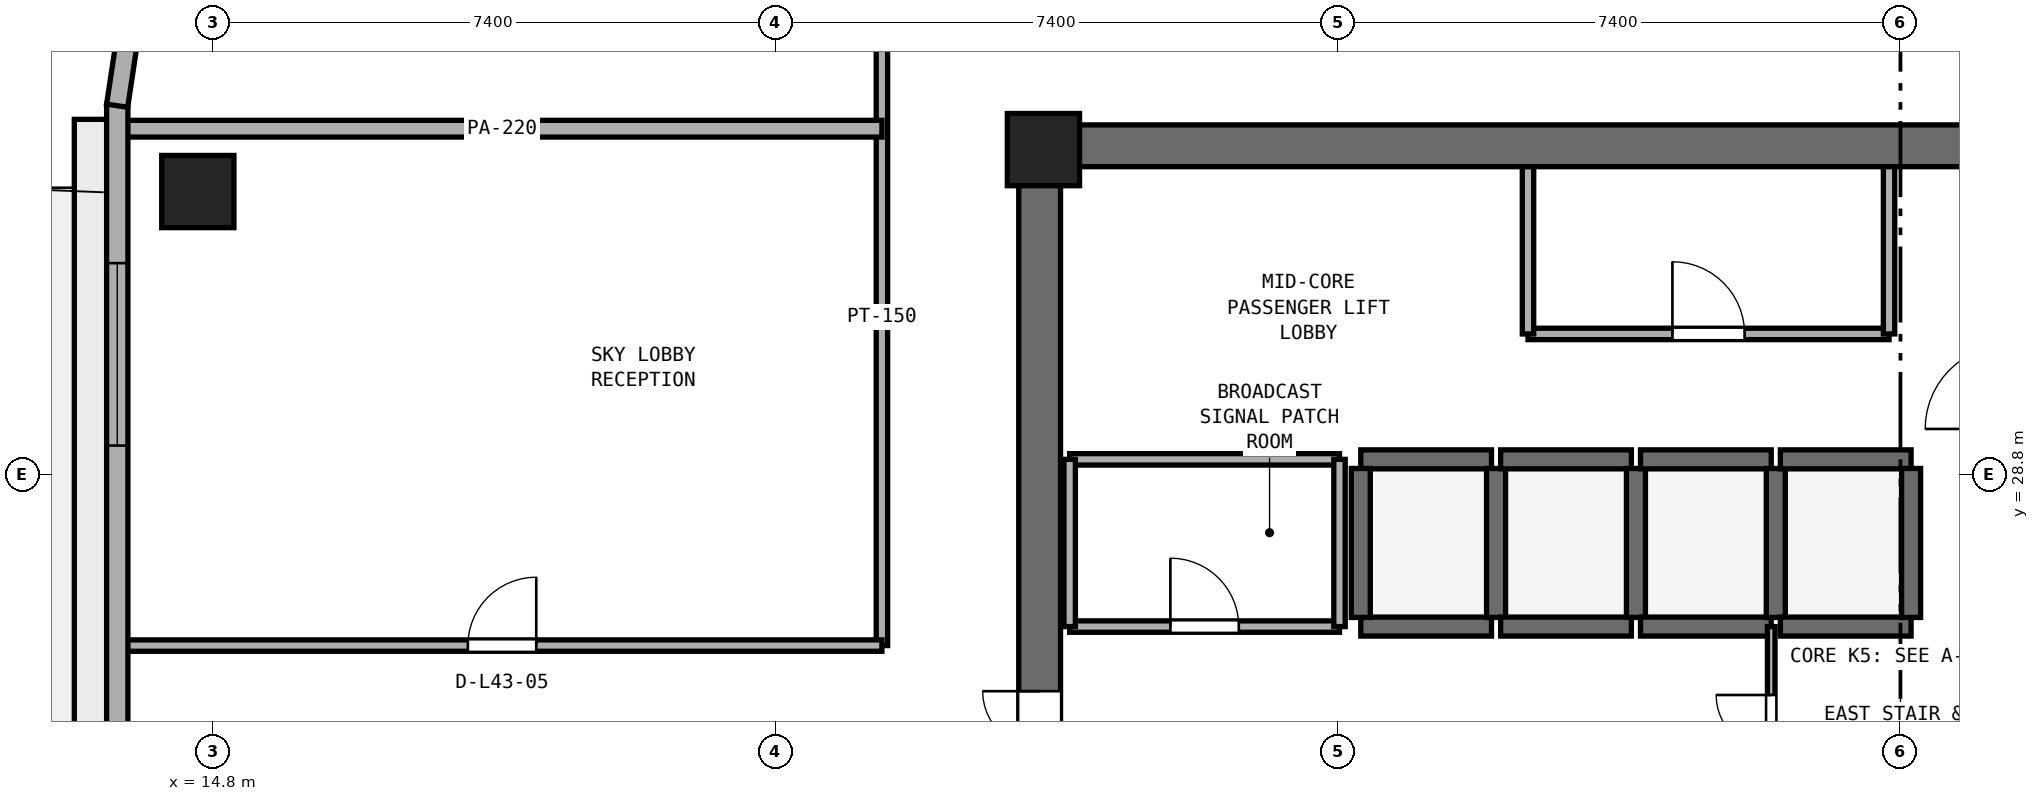
"""IFC4 building model, lengths in metres.
Left out: names, types, materials, properties, quantities, classifications, styles, units other than length and angle.
Written with IfcOpenShell. Run it as: python <this file> out.ifc"""

import sys

from ifc_helpers import new_model, si_unit, direction, frame, frame_2d, origin, origin_2d, place, context, subcontext, project, spatial, rectangle, extrude, element, fill, save


model = new_model("IFC4")
c1 = context("Model", 3, precision=1e-05, world=origin(), true_north=direction((0.0, 1.0)))
c2 = subcontext(c1, "Body", "Model", "MODEL_VIEW")
j1 = project(units=[si_unit("LENGTHUNIT", "METRE"), si_unit("PLANEANGLEUNIT", "RADIAN")], contexts=[c1])
p1 = place(None, origin())
s1 = spatial("IfcSite", under=j1, at=p1, CompositionType="ELEMENT")
p2 = place(p1, origin())
s2 = spatial("IfcBuilding", under=s1, at=p2, CompositionType="ELEMENT")
p3 = place(p2, frame((0.0, 0.0, 170.6)))
s3 = spatial("IfcBuildingStorey", under=s2, at=p3, CompositionType="ELEMENT", Elevation=170.6)
p4 = place(p3, frame((25.4, 33.125, 0.0), z_axis=(0.0, 0.0, 1.0), x_axis=(1.0, 0.0, 0.0)))
e1 = element("IfcWall", 1, at=p4, inside=s3, PredefinedType="SHEAR", context=c2, shape_type="SweptSolid", body=[
    extrude(rectangle(XDim=23.2, YDim=0.55, at=frame_2d((11.6, 0.0))), origin(), (0.0, 0.0, 1.0), 3.54),
])
p5 = place(p3, frame((25.675, 17.55, 0.0), z_axis=(0.0, 0.0, 1.0), x_axis=(0.0, 1.0, 0.0)))
e2 = element("IfcWall", 2, at=p5, inside=s3, PredefinedType="SHEAR", context=c2, shape_type="SweptSolid", body=[
    extrude(rectangle(XDim=15.3, YDim=0.55, at=frame_2d((7.65, 0.0))), origin(), (0.0, 0.0, 1.0), 3.54),
])
p6 = place(p5, frame((6.9, 0.0, 0.0)))
e3 = element("IfcOpeningElement", 3, at=p6, cuts=e2, PredefinedType="OPENING", context=c2, shape_type="SweptSolid", body=[
    extrude(rectangle(XDim=1.5, YDim=2.15, at=frame_2d((0.75, 1.075))), frame((0.0, 0.285, 0.0), z_axis=(0.0, -1.0, 0.0), x_axis=(1.0, 0.0, 0.0)), (0.0, 0.0, 1.0), 0.57),
])
p7 = place(p3, frame((25.725, 33.075, 0.0), z_axis=(0.0, 0.0, 1.0), x_axis=(1.0, 0.0, 0.0)))
e4 = element("IfcColumn", 4, at=p7, inside=s3, PredefinedType="PILASTER", context=c2, shape_type="SweptSolid", body=[
    extrude(rectangle(XDim=0.95, YDim=0.95, at=origin_2d()), origin(), (0.0, 0.0, 1.0), 3.8),
])
p8 = place(p3, frame((14.6, 32.523, 0.0), z_axis=(0.0, 0.0, 1.0), x_axis=(1.0, 0.0, 0.0)))
e5 = element("IfcColumn", 5, at=p8, inside=s3, PredefinedType="COLUMN", context=c2, shape_type="SweptSolid", body=[
    extrude(rectangle(XDim=0.95, YDim=0.95, at=origin_2d()), origin(), (0.0, 0.0, 1.0), 3.8),
])
for number, where, z_axis, x_axis in (
    (6, (29.9, 26.8, 0.0), (0.0, 0.0, 1.0), (1.0, 0.0, 0.0)),
    (7, (29.9, 29.0, 0.0), (0.0, 0.0, 1.0), (1.0, 0.0, 0.0)),
):
    element("IfcWall", number, at=place(p3, frame(where, z_axis=z_axis, x_axis=x_axis)), inside=s3, PredefinedType="SHEAR", context=c2, shape_type="SweptSolid", body=[
        extrude(rectangle(XDim=1.72, YDim=0.25, at=frame_2d((0.86, 0.0))), origin(), (0.0, 0.0, 1.0), 3.54),
    ])
for number, where, z_axis, x_axis in (
    (8, (29.9, 26.92, 0.0), (0.0, 0.0, 1.0), (0.0, 1.0, 0.0)),
    (9, (31.68, 26.92, 0.0), (0.0, 0.0, 1.0), (0.0, 1.0, 0.0)),
):
    element("IfcWall", number, at=place(p3, frame(where, z_axis=z_axis, x_axis=x_axis)), inside=s3, PredefinedType="SHEAR", context=c2, shape_type="SweptSolid", body=[
        extrude(rectangle(XDim=1.96, YDim=0.25, at=frame_2d((0.98, 0.0))), origin(), (0.0, 0.0, 1.0), 3.54),
    ])
for number, where, z_axis, x_axis in (
    (10, (31.74, 26.8, 0.0), (0.0, 0.0, 1.0), (1.0, 0.0, 0.0)),
    (11, (31.74, 29.0, 0.0), (0.0, 0.0, 1.0), (1.0, 0.0, 0.0)),
):
    element("IfcWall", number, at=place(p3, frame(where, z_axis=z_axis, x_axis=x_axis)), inside=s3, PredefinedType="SHEAR", context=c2, shape_type="SweptSolid", body=[
        extrude(rectangle(XDim=1.72, YDim=0.25, at=frame_2d((0.86, 0.0))), origin(), (0.0, 0.0, 1.0), 3.54),
    ])
p9 = place(p3, frame((33.52, 26.92, 0.0), z_axis=(0.0, 0.0, 1.0), x_axis=(0.0, 1.0, 0.0)))
e12 = element("IfcWall", 12, at=p9, inside=s3, PredefinedType="SHEAR", context=c2, shape_type="SweptSolid", body=[
    extrude(rectangle(XDim=1.96, YDim=0.25, at=frame_2d((0.98, 0.0))), origin(), (0.0, 0.0, 1.0), 3.54),
])
for number, where, z_axis, x_axis in (
    (13, (33.58, 26.8, 0.0), (0.0, 0.0, 1.0), (1.0, 0.0, 0.0)),
    (14, (33.58, 29.0, 0.0), (0.0, 0.0, 1.0), (1.0, 0.0, 0.0)),
):
    element("IfcWall", number, at=place(p3, frame(where, z_axis=z_axis, x_axis=x_axis)), inside=s3, PredefinedType="SHEAR", context=c2, shape_type="SweptSolid", body=[
        extrude(rectangle(XDim=1.72, YDim=0.25, at=frame_2d((0.86, 0.0))), origin(), (0.0, 0.0, 1.0), 3.54),
    ])
p10 = place(p3, frame((35.36, 26.92, 0.0), z_axis=(0.0, 0.0, 1.0), x_axis=(0.0, 1.0, 0.0)))
e15 = element("IfcWall", 15, at=p10, inside=s3, PredefinedType="SHEAR", context=c2, shape_type="SweptSolid", body=[
    extrude(rectangle(XDim=1.96, YDim=0.25, at=frame_2d((0.98, 0.0))), origin(), (0.0, 0.0, 1.0), 3.54),
])
for number, where, z_axis, x_axis in (
    (16, (35.42, 26.8, 0.0), (0.0, 0.0, 1.0), (1.0, 0.0, 0.0)),
    (17, (35.42, 29.0, 0.0), (0.0, 0.0, 1.0), (1.0, 0.0, 0.0)),
):
    element("IfcWall", number, at=place(p3, frame(where, z_axis=z_axis, x_axis=x_axis)), inside=s3, PredefinedType="SHEAR", context=c2, shape_type="SweptSolid", body=[
        extrude(rectangle(XDim=1.72, YDim=0.25, at=frame_2d((0.86, 0.0))), origin(), (0.0, 0.0, 1.0), 3.54),
    ])
p11 = place(p3, frame((37.14, 26.92, 0.0), z_axis=(0.0, 0.0, 1.0), x_axis=(0.0, 1.0, 0.0)))
e18 = element("IfcWall", 18, at=p11, inside=s3, PredefinedType="SHEAR", context=c2, shape_type="SweptSolid", body=[
    extrude(rectangle(XDim=1.96, YDim=0.25, at=frame_2d((0.98, 0.0))), origin(), (0.0, 0.0, 1.0), 3.54),
])
p12 = place(p3, frame((32.1, 30.65, 0.0), z_axis=(0.0, 0.0, 1.0), x_axis=(1.0, 0.0, 0.0)))
e19 = element("IfcWall", 19, at=p12, inside=s3, PredefinedType="PARTITIONING", context=c2, shape_type="SweptSolid", body=[
    extrude(rectangle(XDim=4.75, YDim=0.15, at=frame_2d((2.375, 0.0))), origin(), (0.0, 0.0, 1.0), 3.54),
])
p13 = place(p12, frame((1.9, 0.0, 0.0)))
e20 = element("IfcOpeningElement", 20, at=p13, cuts=e19, PredefinedType="OPENING", context=c2, shape_type="SweptSolid", body=[
    extrude(rectangle(XDim=0.95, YDim=2.1, at=frame_2d((0.475, 1.05))), frame((0.0, 0.085, 0.0), z_axis=(0.0, -1.0, 0.0), x_axis=(1.0, 0.0, 0.0)), (0.0, 0.0, 1.0), 0.17),
])
for number, where, z_axis, x_axis in (
    (21, (32.1, 30.65, 0.0), (0.0, 0.0, 1.0), (0.0, 1.0, 0.0)),
    (22, (36.85, 30.65, 0.0), (0.0, 0.0, 1.0), (0.0, 1.0, 0.0)),
):
    element("IfcWall", number, at=place(p3, frame(where, z_axis=z_axis, x_axis=x_axis)), inside=s3, PredefinedType="PARTITIONING", context=c2, shape_type="SweptSolid", body=[
        extrude(rectangle(XDim=2.2, YDim=0.15, at=frame_2d((1.1, 0.0))), origin(), (0.0, 0.0, 1.0), 3.54),
    ])
p14 = place(p3, frame((26.07, 26.8, 0.0), z_axis=(0.0, 0.0, 1.0), x_axis=(1.0, 0.0, 0.0)))
e23 = element("IfcWall", 23, at=p14, inside=s3, PredefinedType="PARTITIONING", context=c2, shape_type="SweptSolid", body=[
    extrude(rectangle(XDim=3.55, YDim=0.15, at=frame_2d((1.775, 0.0))), origin(), (0.0, 0.0, 1.0), 3.54),
])
p15 = place(p14, frame((1.325, 0.0, 0.0)))
e24 = element("IfcOpeningElement", 24, at=p15, cuts=e23, PredefinedType="OPENING", context=c2, shape_type="SweptSolid", body=[
    extrude(rectangle(XDim=0.9, YDim=2.1, at=frame_2d((0.45, 1.05))), frame((0.0, 0.085, 0.0), z_axis=(0.0, -1.0, 0.0), x_axis=(1.0, 0.0, 0.0)), (0.0, 0.0, 1.0), 0.17),
])
p16 = place(p3, frame((26.07, 29.0, 0.0), z_axis=(0.0, 0.0, 1.0), x_axis=(1.0, 0.0, 0.0)))
e25 = element("IfcWall", 25, at=p16, inside=s3, PredefinedType="PARTITIONING", context=c2, shape_type="SweptSolid", body=[
    extrude(rectangle(XDim=3.55, YDim=0.15, at=frame_2d((1.775, 0.0))), origin(), (0.0, 0.0, 1.0), 3.54),
])
p17 = place(p3, frame((26.07, 26.8, 0.0), z_axis=(0.0, 0.0, 1.0), x_axis=(0.0, 1.0, 0.0)))
e26 = element("IfcWall", 26, at=p17, inside=s3, PredefinedType="PARTITIONING", context=c2, shape_type="SweptSolid", body=[
    extrude(rectangle(XDim=2.2, YDim=0.15, at=frame_2d((1.1, 0.0))), origin(), (0.0, 0.0, 1.0), 2.64),
])
p18 = place(p3, frame((29.62, 26.8, 0.0), z_axis=(0.0, 0.0, 1.0), x_axis=(0.0, 1.0, 0.0)))
e27 = element("IfcWall", 27, at=p18, inside=s3, PredefinedType="PARTITIONING", context=c2, shape_type="SweptSolid", body=[
    extrude(rectangle(XDim=2.2, YDim=0.15, at=frame_2d((1.1, 0.0))), origin(), (0.0, 0.0, 1.0), 3.54),
])
p19 = place(p3, frame((35.3, 23.6, 0.0), z_axis=(0.0, 0.0, 1.0), x_axis=(0.0, 1.0, 0.0)))
e28 = element("IfcWall", 28, at=p19, inside=s3, PredefinedType="PARTITIONING", context=c2, shape_type="SweptSolid", body=[
    extrude(rectangle(XDim=3.2, YDim=0.1, at=frame_2d((1.6, 0.0))), origin(), (0.0, 0.0, 1.0), 3.54),
])
p20 = place(p19, frame((0.85, 0.0, 0.0)))
e29 = element("IfcOpeningElement", 29, at=p20, cuts=e28, PredefinedType="OPENING", context=c2, shape_type="SweptSolid", body=[
    extrude(rectangle(XDim=1.45, YDim=2.12, at=frame_2d((0.725, 1.06))), frame((0.0, 0.06, 0.0), z_axis=(0.0, -1.0, 0.0), x_axis=(1.0, 0.0, 0.0)), (0.0, 0.0, 1.0), 0.12),
])
p21 = place(p3, frame((23.6, 26.55, 0.0), z_axis=(0.0, 0.0, 1.0), x_axis=(0.0, 1.0, 0.0)))
e30 = element("IfcWall", 30, at=p21, inside=s3, PredefinedType="PARTITIONING", context=c2, shape_type="SweptSolid", body=[
    extrude(rectangle(XDim=8.65, YDim=0.15, at=frame_2d((4.325, 0.0))), origin(), (0.0, 0.0, 1.0), 3.54),
])
p22 = place(p3, frame((13.605, 26.55, 0.0), z_axis=(0.0, 0.0, 1.0), x_axis=(1.0, 0.0, 0.0)))
e31 = element("IfcWall", 31, at=p22, inside=s3, PredefinedType="PARTITIONING", context=c2, shape_type="SweptSolid", body=[
    extrude(rectangle(XDim=9.995, YDim=0.15, at=frame_2d((4.998, 0.0))), origin(), (0.0, 0.0, 1.0), 3.54),
])
p23 = place(p22, frame((4.548, 0.0, 0.0)))
e32 = element("IfcOpeningElement", 32, at=p23, cuts=e31, PredefinedType="OPENING", context=c2, shape_type="SweptSolid", body=[
    extrude(rectangle(XDim=0.9, YDim=2.1, at=frame_2d((0.45, 1.05))), frame((0.0, 0.085, 0.0), z_axis=(0.0, -1.0, 0.0), x_axis=(1.0, 0.0, 0.0)), (0.0, 0.0, 1.0), 0.17),
])
p24 = place(p3, frame((13.605, 33.35, 0.0), z_axis=(0.0, 0.0, 1.0), x_axis=(1.0, 0.0, 0.0)))
e33 = element("IfcWall", 33, at=p24, inside=s3, PredefinedType="PARTITIONING", context=c2, shape_type="SweptSolid", body=[
    extrude(rectangle(XDim=9.995, YDim=0.22, at=frame_2d((4.998, 0.0))), origin(), (0.0, 0.0, 1.0), 3.54),
])
p25 = place(p3, frame((13.54, 33.673, 0.0), z_axis=(0.0, 0.0, 1.0), x_axis=(0.0, -1.0, 0.0)))
e34 = element("IfcWall", 34, at=p25, inside=s3, PredefinedType="STANDARD", context=c2, shape_type="SweptSolid", body=[
    extrude(rectangle(XDim=17.751, YDim=0.28, at=frame_2d((8.875, 0.0))), origin(), (0.0, 0.0, 1.0), 3.54),
])
p26 = place(p25, frame((8.326, 0.0, 0.0)))
e35 = element("IfcOpeningElement", 35, at=p26, cuts=e34, PredefinedType="OPENING", context=c2, shape_type="SweptSolid", body=[
    extrude(rectangle(XDim=1.1, YDim=2.2, at=frame_2d((0.55, 1.1))), frame((0.0, 0.15, 0.0), z_axis=(0.0, -1.0, 0.0), x_axis=(1.0, 0.0, 0.0)), (0.0, 0.0, 1.0), 0.3),
])
p27 = place(p25, frame((2.092, 0.0, 0.9)))
e36 = element("IfcOpeningElement", 36, at=p27, cuts=e34, PredefinedType="OPENING", context=c2, shape_type="SweptSolid", body=[
    extrude(rectangle(XDim=2.4, YDim=1.75, at=frame_2d((1.2, 0.875))), frame((0.0, 0.15, 0.0), z_axis=(0.0, -1.0, 0.0), x_axis=(1.0, 0.0, 0.0)), (0.0, 0.0, 1.0), 0.3),
])
p28 = place(p25, frame((13.26, 0.0, 0.9)))
e37 = element("IfcOpeningElement", 37, at=p28, cuts=e34, PredefinedType="OPENING", context=c2, shape_type="SweptSolid", body=[
    extrude(rectangle(XDim=2.4, YDim=1.75, at=frame_2d((1.2, 0.875))), frame((0.0, 0.15, 0.0), z_axis=(0.0, -1.0, 0.0), x_axis=(1.0, 0.0, 0.0)), (0.0, 0.0, 1.0), 0.3),
])
p29 = place(p3, frame((13.699, 34.716, 0.0), z_axis=(0.0, 0.0, 1.0), x_axis=(-0.149549920187, -0.988754176412, 0.0)))
e38 = element("IfcWall", 38, at=p29, inside=s3, PredefinedType="STANDARD", context=c2, shape_type="SweptSolid", body=[
    extrude(rectangle(XDim=1.076, YDim=0.28, at=frame_2d((0.538, 0.0))), origin(), (0.0, 0.0, 1.0), 3.54),
])
p30 = place(p6, origin())
e39 = element("IfcDoor", 39, at=p30, inside=s3, OperationType="DOUBLE_DOOR_SINGLE_SWING", PredefinedType="DOOR", context=c2, shape_type="SweptSolid", body=[
    extrude(rectangle(XDim=1.5, YDim=2.15, at=frame_2d((0.75, 1.075))), frame((0.0, 0.025, 0.0), z_axis=(0.0, -1.0, 0.0), x_axis=(1.0, 0.0, 0.0)), (0.0, 0.0, 1.0), 0.05),
])
fill(e3, e39)
p31 = place(p13, origin())
e40 = element("IfcDoor", 40, at=p31, inside=s3, OperationType="SINGLE_SWING_LEFT", PredefinedType="DOOR", context=c2, shape_type="SweptSolid", body=[
    extrude(rectangle(XDim=0.95, YDim=2.1, at=frame_2d((0.475, 1.05))), frame((0.0, 0.025, 0.0), z_axis=(0.0, -1.0, 0.0), x_axis=(1.0, 0.0, 0.0)), (0.0, 0.0, 1.0), 0.05),
])
fill(e20, e40)
p32 = place(p15, origin())
e41 = element("IfcDoor", 41, at=p32, inside=s3, OperationType="SINGLE_SWING_LEFT", PredefinedType="DOOR", context=c2, shape_type="SweptSolid", body=[
    extrude(rectangle(XDim=0.9, YDim=2.1, at=frame_2d((0.45, 1.05))), frame((0.0, 0.025, 0.0), z_axis=(0.0, -1.0, 0.0), x_axis=(1.0, 0.0, 0.0)), (0.0, 0.0, 1.0), 0.05),
])
fill(e24, e41)
p33 = place(p20, origin())
e42 = element("IfcDoor", 42, at=p33, inside=s3, OperationType="DOUBLE_DOOR_SINGLE_SWING", PredefinedType="DOOR", context=c2, shape_type="SweptSolid", body=[
    extrude(rectangle(XDim=1.45, YDim=2.12, at=frame_2d((0.725, 1.06))), frame((0.0, 0.025, 0.0), z_axis=(0.0, -1.0, 0.0), x_axis=(1.0, 0.0, 0.0)), (0.0, 0.0, 1.0), 0.05),
])
fill(e29, e42)
p34 = place(p23, origin())
e43 = element("IfcDoor", 43, at=p34, inside=s3, OperationType="SINGLE_SWING_RIGHT", PredefinedType="DOOR", context=c2, shape_type="SweptSolid", body=[
    extrude(rectangle(XDim=0.9, YDim=2.1, at=frame_2d((0.45, 1.05))), frame((0.0, 0.025, 0.0), z_axis=(0.0, -1.0, 0.0), x_axis=(1.0, 0.0, 0.0)), (0.0, 0.0, 1.0), 0.05),
])
fill(e32, e43)
p35 = place(p27, origin())
e44 = element("IfcWindow", 44, at=p35, inside=s3, PartitioningType="SINGLE_PANEL", PredefinedType="WINDOW", context=c2, shape_type="SweptSolid", body=[
    extrude(rectangle(XDim=2.4, YDim=1.75, at=frame_2d((1.2, 0.875))), frame((0.0, 0.03, 0.0), z_axis=(0.0, -1.0, 0.0), x_axis=(1.0, 0.0, 0.0)), (0.0, 0.0, 1.0), 0.06),
])
fill(e36, e44)
save(model, sys.argv[1])
